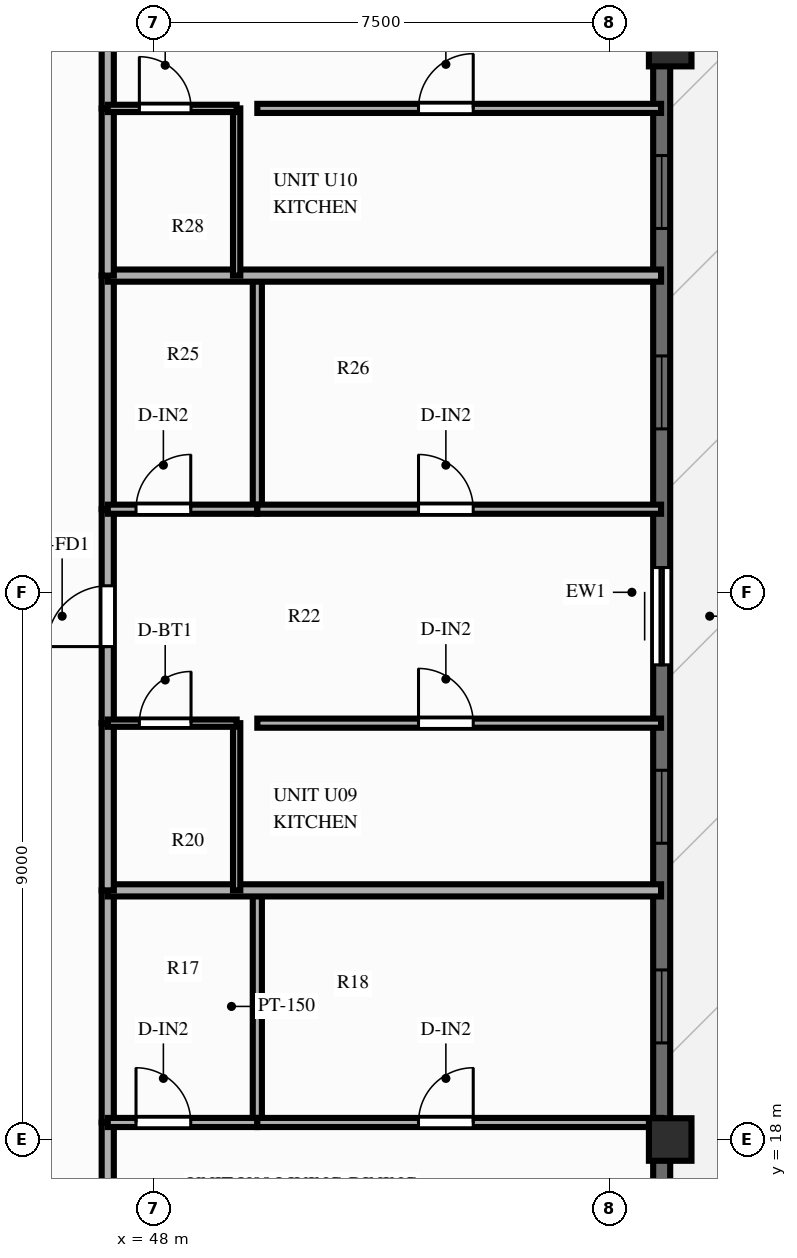
"""IFC4 building model, lengths in metres.
Left out: names, types, materials, properties, quantities, classifications, styles, units other than length and angle.
Written with IfcOpenShell. Run it as: python <this file> out.ifc"""

import sys

from ifc_helpers import new_model, si_unit, direction, frame, frame_2d, origin, origin_2d, place, context, subcontext, project, spatial, rectangle, extrude, source, transform, mapped, element, fill, save


model = new_model("IFC4")
c1 = context("Model", 3, precision=1e-05, world=origin(), true_north=direction((0.0, 1.0)))
c2 = subcontext(c1, "Body", "Model", "MODEL_VIEW")
j1 = project(units=[si_unit("LENGTHUNIT", "METRE"), si_unit("PLANEANGLEUNIT", "RADIAN")], contexts=[c1])
p1 = place(None, origin())
s1 = spatial("IfcSite", under=j1, at=p1, CompositionType="ELEMENT")
p2 = place(p1, origin())
s2 = spatial("IfcBuilding", under=s1, at=p2, CompositionType="ELEMENT")
p3 = place(p2, frame((0.0, 0.0, 216.3)))
s3 = spatial("IfcBuildingStorey", under=s2, at=p3, CompositionType="ELEMENT", Elevation=216.3)
m1 = source(origin(), c2, "Body", "SweptSolid", [
    extrude(rectangle(XDim=0.7, YDim=0.7, at=origin_2d()), origin(), (0.0, 0.0, 1.0), 3.9),
])
for number, where, z_axis, x_axis in (
    (1, (56.5, 18.0, 0.0), (0.0, 0.0, 1.0), (1.0, 0.0, 0.0)),
    (2, (56.5, 36.0, 0.0), (0.0, 0.0, 1.0), (1.0, 0.0, 0.0)),
):
    element("IfcColumn", number, at=place(p3, frame(where, z_axis=z_axis, x_axis=x_axis)), inside=s3, PredefinedType="COLUMN", context=c2, shape_type="MappedRepresentation", body=[
        mapped(m1, transform((0.0, 0.0, 0.0), scale=1.0)),
    ])
p4 = place(p3, frame((56.36, 11.5, 0.0), z_axis=(0.0, 0.0, 1.0), x_axis=(0.0, 1.0, 0.0)))
e3 = element("IfcWall", 3, at=p4, inside=s3, PredefinedType="SOLIDWALL", context=c2, shape_type="SweptSolid", body=[
    extrude(rectangle(XDim=31.0, YDim=0.28, at=frame_2d((15.5, 0.0))), origin(), (0.0, 0.0, 1.0), 2.44),
])
p5 = place(p4, frame((0.96, 0.0, 0.25)))
e4 = element("IfcOpeningElement", 4, at=p5, cuts=e3, PredefinedType="OPENING", context=c2, shape_type="SweptSolid", body=[
    extrude(rectangle(XDim=1.2, YDim=1.5, at=frame_2d((0.6, 0.75))), frame((0.0, 0.152, 0.0), z_axis=(0.0, -1.0, 0.0), x_axis=(1.0, 0.0, 0.0)), (0.0, 0.0, 1.0), 0.304),
])
p6 = place(p4, frame((4.02, 0.0, 0.25)))
e5 = element("IfcOpeningElement", 5, at=p6, cuts=e3, PredefinedType="OPENING", context=c2, shape_type="SweptSolid", body=[
    extrude(rectangle(XDim=1.2, YDim=1.5, at=frame_2d((0.6, 0.75))), frame((0.0, 0.152, 0.0), z_axis=(0.0, -1.0, 0.0), x_axis=(1.0, 0.0, 0.0)), (0.0, 0.0, 1.0), 0.304),
])
p7 = place(p4, frame((8.089, 0.0, 0.25)))
e6 = element("IfcOpeningElement", 6, at=p7, cuts=e3, PredefinedType="OPENING", context=c2, shape_type="SweptSolid", body=[
    extrude(rectangle(XDim=1.2, YDim=1.5, at=frame_2d((0.6, 0.75))), frame((0.0, 0.152, 0.0), z_axis=(0.0, -1.0, 0.0), x_axis=(1.0, 0.0, 0.0)), (0.0, 0.0, 1.0), 0.304),
])
p8 = place(p4, frame((11.373, 0.0, 0.25)))
e7 = element("IfcOpeningElement", 7, at=p8, cuts=e3, PredefinedType="OPENING", context=c2, shape_type="SweptSolid", body=[
    extrude(rectangle(XDim=1.2, YDim=1.5, at=frame_2d((0.6, 0.75))), frame((0.0, 0.152, 0.0), z_axis=(0.0, -1.0, 0.0), x_axis=(1.0, 0.0, 0.0)), (0.0, 0.0, 1.0), 0.304),
])
p9 = place(p4, frame((15.907, 0.0, 0.0), z_axis=(0.0, 0.0, 1.0), x_axis=(-1.0, 0.0, 0.0)))
e8 = element("IfcOpeningElement", 8, at=p9, cuts=e3, PredefinedType="OPENING", context=c2, shape_type="SweptSolid", body=[
    extrude(rectangle(XDim=1.6, YDim=2.15, at=frame_2d((0.8, 1.075))), frame((0.0, 0.152, 0.0), z_axis=(0.0, -1.0, 0.0), x_axis=(1.0, 0.0, 0.0)), (0.0, 0.0, 1.0), 0.304),
])
p10 = place(p4, frame((18.188, 0.0, 0.25)))
e9 = element("IfcOpeningElement", 9, at=p10, cuts=e3, PredefinedType="OPENING", context=c2, shape_type="SweptSolid", body=[
    extrude(rectangle(XDim=1.2, YDim=1.5, at=frame_2d((0.6, 0.75))), frame((0.0, 0.152, 0.0), z_axis=(0.0, -1.0, 0.0), x_axis=(1.0, 0.0, 0.0)), (0.0, 0.0, 1.0), 0.304),
])
p11 = place(p4, frame((21.484, 0.0, 0.25)))
e10 = element("IfcOpeningElement", 10, at=p11, cuts=e3, PredefinedType="OPENING", context=c2, shape_type="SweptSolid", body=[
    extrude(rectangle(XDim=1.2, YDim=1.5, at=frame_2d((0.6, 0.75))), frame((0.0, 0.152, 0.0), z_axis=(0.0, -1.0, 0.0), x_axis=(1.0, 0.0, 0.0)), (0.0, 0.0, 1.0), 0.304),
])
p12 = place(p4, frame((25.234, 0.0, 0.25)))
e11 = element("IfcOpeningElement", 11, at=p12, cuts=e3, PredefinedType="OPENING", context=c2, shape_type="SweptSolid", body=[
    extrude(rectangle(XDim=1.2, YDim=1.5, at=frame_2d((0.6, 0.75))), frame((0.0, 0.152, 0.0), z_axis=(0.0, -1.0, 0.0), x_axis=(1.0, 0.0, 0.0)), (0.0, 0.0, 1.0), 0.304),
])
p13 = place(p4, frame((28.294, 0.0, 0.25)))
e12 = element("IfcOpeningElement", 12, at=p13, cuts=e3, PredefinedType="OPENING", context=c2, shape_type="SweptSolid", body=[
    extrude(rectangle(XDim=1.2, YDim=1.5, at=frame_2d((0.6, 0.75))), frame((0.0, 0.152, 0.0), z_axis=(0.0, -1.0, 0.0), x_axis=(1.0, 0.0, 0.0)), (0.0, 0.0, 1.0), 0.304),
])
p14 = place(p3, frame((47.25, 14.43, 0.0), z_axis=(0.0, 0.0, 1.0), x_axis=(0.0, 1.0, 0.0)))
e13 = element("IfcWall", 13, at=p14, inside=s3, PredefinedType="PARTITIONING", context=c2, shape_type="SweptSolid", body=[
    extrude(rectangle(XDim=3.85, YDim=0.2, at=frame_2d((1.925, 0.0))), origin(), (0.0, 0.0, 1.0), 3.56),
])
p15 = place(p14, frame((1.425, 0.0, 0.0)))
e14 = element("IfcOpeningElement", 14, at=p15, cuts=e13, PredefinedType="OPENING", context=c2, shape_type="SweptSolid", body=[
    extrude(rectangle(XDim=1.0, YDim=2.15, at=frame_2d((0.5, 1.075))), frame((0.0, 0.112, 0.0), z_axis=(0.0, -1.0, 0.0), x_axis=(1.0, 0.0, 0.0)), (0.0, 0.0, 1.0), 0.224),
])
p16 = place(p3, frame((47.25, 18.28, 0.0), z_axis=(0.0, 0.0, 1.0), x_axis=(0.0, 1.0, 0.0)))
e15 = element("IfcWall", 15, at=p16, inside=s3, PredefinedType="PARTITIONING", context=c2, shape_type="SweptSolid", body=[
    extrude(rectangle(XDim=3.818, YDim=0.2, at=frame_2d((1.909, 0.0))), origin(), (0.0, 0.0, 1.0), 3.56),
])
p17 = place(p3, frame((49.71, 18.28, 0.0), z_axis=(0.0, 0.0, 1.0), x_axis=(0.0, 1.0, 0.0)))
e16 = element("IfcWall", 16, at=p17, inside=s3, PredefinedType="PARTITIONING", context=c2, shape_type="SweptSolid", body=[
    extrude(rectangle(XDim=3.818, YDim=0.15, at=frame_2d((1.909, 0.0))), origin(), (0.0, 0.0, 1.0), 3.56),
])
p18 = place(p3, frame((47.25, 18.28, 0.0), z_axis=(0.0, 0.0, 1.0), x_axis=(1.0, 0.0, 0.0)))
e17 = element("IfcWall", 17, at=p18, inside=s3, PredefinedType="PARTITIONING", context=c2, shape_type="SweptSolid", body=[
    extrude(rectangle(XDim=2.46, YDim=0.15, at=frame_2d((1.23, 0.0))), origin(), (0.0, 0.0, 1.0), 3.56),
])
p19 = place(p18, frame((0.465, 0.0, 0.0)))
e18 = element("IfcOpeningElement", 18, at=p19, cuts=e17, PredefinedType="OPENING", context=c2, shape_type="SweptSolid", body=[
    extrude(rectangle(XDim=0.9, YDim=2.1, at=frame_2d((0.45, 1.05))), frame((0.0, 0.087, 0.0), z_axis=(0.0, -1.0, 0.0), x_axis=(1.0, 0.0, 0.0)), (0.0, 0.0, 1.0), 0.174),
])
p20 = place(p3, frame((49.71, 18.28, 0.0), z_axis=(0.0, 0.0, 1.0), x_axis=(1.0, 0.0, 0.0)))
e19 = element("IfcWall", 19, at=p20, inside=s3, PredefinedType="PARTITIONING", context=c2, shape_type="SweptSolid", body=[
    extrude(rectangle(XDim=6.64, YDim=0.15, at=frame_2d((3.32, 0.0))), origin(), (0.0, 0.0, 1.0), 3.56),
])
p21 = place(p20, frame((2.651, 0.0, 0.0)))
e20 = element("IfcOpeningElement", 20, at=p21, cuts=e19, PredefinedType="OPENING", context=c2, shape_type="SweptSolid", body=[
    extrude(rectangle(XDim=0.9, YDim=2.1, at=frame_2d((0.45, 1.05))), frame((0.0, 0.087, 0.0), z_axis=(0.0, -1.0, 0.0), x_axis=(1.0, 0.0, 0.0)), (0.0, 0.0, 1.0), 0.174),
])
p22 = place(p3, frame((47.25, 22.098, 0.0), z_axis=(0.0, 0.0, 1.0), x_axis=(1.0, 0.0, 0.0)))
e21 = element("IfcWall", 21, at=p22, inside=s3, PredefinedType="PARTITIONING", context=c2, shape_type="SweptSolid", body=[
    extrude(rectangle(XDim=9.1, YDim=0.2, at=frame_2d((4.55, 0.0))), origin(), (0.0, 0.0, 1.0), 3.29),
])
p23 = place(p3, frame((47.25, 22.098, 0.0), z_axis=(0.0, 0.0, 1.0), x_axis=(0.0, 1.0, 0.0)))
e22 = element("IfcWall", 22, at=p23, inside=s3, PredefinedType="PARTITIONING", context=c2, shape_type="SweptSolid", body=[
    extrude(rectangle(XDim=2.75, YDim=0.2, at=frame_2d((1.375, 0.0))), origin(), (0.0, 0.0, 1.0), 3.56),
])
p24 = place(p3, frame((47.25, 24.848, 0.0), z_axis=(0.0, 0.0, 1.0), x_axis=(0.0, 1.0, 0.0)))
e23 = element("IfcWall", 23, at=p24, inside=s3, PredefinedType="PARTITIONING", context=c2, shape_type="SweptSolid", body=[
    extrude(rectangle(XDim=3.519, YDim=0.2, at=frame_2d((1.759, 0.0))), origin(), (0.0, 0.0, 1.0), 3.56),
])
p25 = place(p24, frame((1.26, 0.0, 0.0)))
e24 = element("IfcOpeningElement", 24, at=p25, cuts=e23, PredefinedType="OPENING", context=c2, shape_type="SweptSolid", body=[
    extrude(rectangle(XDim=1.0, YDim=2.15, at=frame_2d((0.5, 1.075))), frame((0.0, 0.112, 0.0), z_axis=(0.0, -1.0, 0.0), x_axis=(1.0, 0.0, 0.0)), (0.0, 0.0, 1.0), 0.224),
])
p26 = place(p3, frame((47.25, 28.366, 0.0), z_axis=(0.0, 0.0, 1.0), x_axis=(0.0, 1.0, 0.0)))
e25 = element("IfcWall", 25, at=p26, inside=s3, PredefinedType="PARTITIONING", context=c2, shape_type="SweptSolid", body=[
    extrude(rectangle(XDim=3.842, YDim=0.2, at=frame_2d((1.921, 0.0))), origin(), (0.0, 0.0, 1.0), 3.56),
])
p27 = place(p3, frame((49.37, 22.098, 0.0), z_axis=(0.0, 0.0, 1.0), x_axis=(0.0, 1.0, 0.0)))
e26 = element("IfcWall", 26, at=p27, inside=s3, PredefinedType="PARTITIONING", context=c2, shape_type="SweptSolid", body=[
    extrude(rectangle(XDim=2.75, YDim=0.12, at=frame_2d((1.375, 0.0))), origin(), (0.0, 0.0, 1.0), 3.56),
])
p28 = place(p3, frame((49.71, 28.366, 0.0), z_axis=(0.0, 0.0, 1.0), x_axis=(0.0, 1.0, 0.0)))
e27 = element("IfcWall", 27, at=p28, inside=s3, PredefinedType="PARTITIONING", context=c2, shape_type="SweptSolid", body=[
    extrude(rectangle(XDim=3.842, YDim=0.15, at=frame_2d((1.921, 0.0))), origin(), (0.0, 0.0, 1.0), 3.56),
])
p29 = place(p3, frame((47.25, 24.848, 0.0), z_axis=(0.0, 0.0, 1.0), x_axis=(1.0, 0.0, 0.0)))
e28 = element("IfcWall", 28, at=p29, inside=s3, PredefinedType="PARTITIONING", context=c2, shape_type="SweptSolid", body=[
    extrude(rectangle(XDim=2.12, YDim=0.12, at=frame_2d((1.06, 0.0))), origin(), (0.0, 0.0, 1.0), 3.56),
])
p30 = place(p29, frame((0.52, 0.0, 0.0)))
e29 = element("IfcOpeningElement", 29, at=p30, cuts=e28, PredefinedType="OPENING", context=c2, shape_type="SweptSolid", body=[
    extrude(rectangle(XDim=0.85, YDim=2.05, at=frame_2d((0.425, 1.025))), frame((0.0, 0.072, 0.0), z_axis=(0.0, -1.0, 0.0), x_axis=(1.0, 0.0, 0.0)), (0.0, 0.0, 1.0), 0.144),
])
p31 = place(p3, frame((49.71, 24.848, 0.0), z_axis=(0.0, 0.0, 1.0), x_axis=(1.0, 0.0, 0.0)))
e30 = element("IfcWall", 30, at=p31, inside=s3, PredefinedType="PARTITIONING", context=c2, shape_type="SweptSolid", body=[
    extrude(rectangle(XDim=6.64, YDim=0.15, at=frame_2d((3.32, 0.0))), origin(), (0.0, 0.0, 1.0), 3.56),
])
p32 = place(p31, frame((2.651, 0.0, 0.0)))
e31 = element("IfcOpeningElement", 31, at=p32, cuts=e30, PredefinedType="OPENING", context=c2, shape_type="SweptSolid", body=[
    extrude(rectangle(XDim=0.9, YDim=2.1, at=frame_2d((0.45, 1.05))), frame((0.0, 0.087, 0.0), z_axis=(0.0, -1.0, 0.0), x_axis=(1.0, 0.0, 0.0)), (0.0, 0.0, 1.0), 0.174),
])
p33 = place(p3, frame((47.25, 28.366, 0.0), z_axis=(0.0, 0.0, 1.0), x_axis=(1.0, 0.0, 0.0)))
e32 = element("IfcWall", 32, at=p33, inside=s3, PredefinedType="PARTITIONING", context=c2, shape_type="SweptSolid", body=[
    extrude(rectangle(XDim=2.46, YDim=0.15, at=frame_2d((1.23, 0.0))), origin(), (0.0, 0.0, 1.0), 3.56),
])
p34 = place(p33, frame((0.465, 0.0, 0.0)))
e33 = element("IfcOpeningElement", 33, at=p34, cuts=e32, PredefinedType="OPENING", context=c2, shape_type="SweptSolid", body=[
    extrude(rectangle(XDim=0.9, YDim=2.1, at=frame_2d((0.45, 1.05))), frame((0.0, 0.087, 0.0), z_axis=(0.0, -1.0, 0.0), x_axis=(1.0, 0.0, 0.0)), (0.0, 0.0, 1.0), 0.174),
])
p35 = place(p3, frame((49.71, 28.366, 0.0), z_axis=(0.0, 0.0, 1.0), x_axis=(1.0, 0.0, 0.0)))
e34 = element("IfcWall", 34, at=p35, inside=s3, PredefinedType="PARTITIONING", context=c2, shape_type="SweptSolid", body=[
    extrude(rectangle(XDim=6.64, YDim=0.15, at=frame_2d((3.32, 0.0))), origin(), (0.0, 0.0, 1.0), 3.56),
])
p36 = place(p35, frame((2.651, 0.0, 0.0)))
e35 = element("IfcOpeningElement", 35, at=p36, cuts=e34, PredefinedType="OPENING", context=c2, shape_type="SweptSolid", body=[
    extrude(rectangle(XDim=0.9, YDim=2.1, at=frame_2d((0.45, 1.05))), frame((0.0, 0.087, 0.0), z_axis=(0.0, -1.0, 0.0), x_axis=(1.0, 0.0, 0.0)), (0.0, 0.0, 1.0), 0.174),
])
p37 = place(p3, frame((47.25, 32.209, 0.0), z_axis=(0.0, 0.0, 1.0), x_axis=(1.0, 0.0, 0.0)))
e36 = element("IfcWall", 36, at=p37, inside=s3, PredefinedType="PARTITIONING", context=c2, shape_type="SweptSolid", body=[
    extrude(rectangle(XDim=9.1, YDim=0.2, at=frame_2d((4.55, 0.0))), origin(), (0.0, 0.0, 1.0), 3.29),
])
p38 = place(p3, frame((47.25, 32.209, 0.0), z_axis=(0.0, 0.0, 1.0), x_axis=(0.0, 1.0, 0.0)))
e37 = element("IfcWall", 37, at=p38, inside=s3, PredefinedType="PARTITIONING", context=c2, shape_type="SweptSolid", body=[
    extrude(rectangle(XDim=2.75, YDim=0.2, at=frame_2d((1.375, 0.0))), origin(), (0.0, 0.0, 1.0), 3.56),
])
p39 = place(p3, frame((47.25, 34.959, 0.0), z_axis=(0.0, 0.0, 1.0), x_axis=(0.0, 1.0, 0.0)))
e38 = element("IfcWall", 38, at=p39, inside=s3, PredefinedType="PARTITIONING", context=c2, shape_type="SweptSolid", body=[
    extrude(rectangle(XDim=3.519, YDim=0.2, at=frame_2d((1.76, 0.0))), origin(), (0.0, 0.0, 1.0), 3.56),
])
p40 = place(p39, frame((2.217, 0.0, 0.0)))
e39 = element("IfcOpeningElement", 39, at=p40, cuts=e38, PredefinedType="OPENING", context=c2, shape_type="SweptSolid", body=[
    extrude(rectangle(XDim=1.0, YDim=2.15, at=frame_2d((0.5, 1.075))), frame((0.0, 0.112, 0.0), z_axis=(0.0, -1.0, 0.0), x_axis=(1.0, 0.0, 0.0)), (0.0, 0.0, 1.0), 0.224),
])
p41 = place(p3, frame((49.37, 32.209, 0.0), z_axis=(0.0, 0.0, 1.0), x_axis=(0.0, 1.0, 0.0)))
e40 = element("IfcWall", 40, at=p41, inside=s3, PredefinedType="PARTITIONING", context=c2, shape_type="SweptSolid", body=[
    extrude(rectangle(XDim=2.75, YDim=0.12, at=frame_2d((1.375, 0.0))), origin(), (0.0, 0.0, 1.0), 3.56),
])
p42 = place(p3, frame((47.25, 34.959, 0.0), z_axis=(0.0, 0.0, 1.0), x_axis=(1.0, 0.0, 0.0)))
e41 = element("IfcWall", 41, at=p42, inside=s3, PredefinedType="PARTITIONING", context=c2, shape_type="SweptSolid", body=[
    extrude(rectangle(XDim=2.12, YDim=0.12, at=frame_2d((1.06, 0.0))), origin(), (0.0, 0.0, 1.0), 3.56),
])
p43 = place(p42, frame((0.52, 0.0, 0.0)))
e42 = element("IfcOpeningElement", 42, at=p43, cuts=e41, PredefinedType="OPENING", context=c2, shape_type="SweptSolid", body=[
    extrude(rectangle(XDim=0.85, YDim=2.05, at=frame_2d((0.425, 1.025))), frame((0.0, 0.072, 0.0), z_axis=(0.0, -1.0, 0.0), x_axis=(1.0, 0.0, 0.0)), (0.0, 0.0, 1.0), 0.144),
])
p44 = place(p3, frame((49.71, 34.959, 0.0), z_axis=(0.0, 0.0, 1.0), x_axis=(1.0, 0.0, 0.0)))
e43 = element("IfcWall", 43, at=p44, inside=s3, PredefinedType="PARTITIONING", context=c2, shape_type="SweptSolid", body=[
    extrude(rectangle(XDim=6.64, YDim=0.15, at=frame_2d((3.32, 0.0))), origin(), (0.0, 0.0, 1.0), 3.56),
])
p45 = place(p44, frame((2.651, 0.0, 0.0)))
e44 = element("IfcOpeningElement", 44, at=p45, cuts=e43, PredefinedType="OPENING", context=c2, shape_type="SweptSolid", body=[
    extrude(rectangle(XDim=0.9, YDim=2.1, at=frame_2d((0.45, 1.05))), frame((0.0, 0.087, 0.0), z_axis=(0.0, -1.0, 0.0), x_axis=(1.0, 0.0, 0.0)), (0.0, 0.0, 1.0), 0.174),
])
m2 = source(origin(), c2, "Body", "SweptSolid", [
    extrude(rectangle(XDim=1.2, YDim=1.5, at=frame_2d((0.6, 0.75))), frame((0.0, 0.03, 0.0), z_axis=(0.0, -1.0, 0.0), x_axis=(1.0, 0.0, 0.0)), (0.0, 0.0, 1.0), 0.06),
])
p46 = place(p7, origin())
e45 = element("IfcWindow", 45, at=p46, inside=s3, PartitioningType="SINGLE_PANEL", PredefinedType="WINDOW", context=c2, shape_type="MappedRepresentation", body=[
    mapped(m2, transform((0.0, 0.0, 0.0), scale=1.0)),
])
fill(e6, e45)
p47 = place(p8, origin())
e46 = element("IfcWindow", 46, at=p47, inside=s3, PartitioningType="SINGLE_PANEL", PredefinedType="WINDOW", context=c2, shape_type="MappedRepresentation", body=[
    mapped(m2, transform((0.0, 0.0, 0.0), scale=1.0)),
])
fill(e7, e46)
m3 = source(origin(), c2, "Body", "SweptSolid", [
    extrude(rectangle(XDim=1.6, YDim=2.15, at=frame_2d((0.8, 1.075))), frame((0.0, 0.025, 0.0), z_axis=(0.0, -1.0, 0.0), x_axis=(1.0, 0.0, 0.0)), (0.0, 0.0, 1.0), 0.05),
])
p48 = place(p9, origin())
e47 = element("IfcDoor", 47, at=p48, inside=s3, OperationType="SLIDING_TO_LEFT", PredefinedType="DOOR", context=c2, shape_type="MappedRepresentation", body=[
    mapped(m3, transform((0.0, 0.0, 0.0), scale=1.0)),
])
fill(e8, e47)
p49 = place(p10, origin())
e48 = element("IfcWindow", 48, at=p49, inside=s3, PartitioningType="SINGLE_PANEL", PredefinedType="WINDOW", context=c2, shape_type="MappedRepresentation", body=[
    mapped(m2, transform((0.0, 0.0, 0.0), scale=1.0)),
])
fill(e9, e48)
p50 = place(p11, origin())
e49 = element("IfcWindow", 49, at=p50, inside=s3, PartitioningType="SINGLE_PANEL", PredefinedType="WINDOW", context=c2, shape_type="MappedRepresentation", body=[
    mapped(m2, transform((0.0, 0.0, 0.0), scale=1.0)),
])
fill(e10, e49)
m4 = source(origin(), c2, "Body", "SweptSolid", [
    extrude(rectangle(XDim=0.9, YDim=2.1, at=frame_2d((0.45, 1.05))), frame((0.0, 0.025, 0.0), z_axis=(0.0, -1.0, 0.0), x_axis=(1.0, 0.0, 0.0)), (0.0, 0.0, 1.0), 0.05),
])
p51 = place(p19, origin())
e50 = element("IfcDoor", 50, at=p51, inside=s3, OperationType="SINGLE_SWING_LEFT", PredefinedType="DOOR", context=c2, shape_type="MappedRepresentation", body=[
    mapped(m4, transform((0.0, 0.0, 0.0), scale=1.0)),
])
fill(e18, e50)
p52 = place(p21, origin())
e51 = element("IfcDoor", 51, at=p52, inside=s3, OperationType="SINGLE_SWING_RIGHT", PredefinedType="DOOR", context=c2, shape_type="MappedRepresentation", body=[
    mapped(m4, transform((0.0, 0.0, 0.0), scale=1.0)),
])
fill(e20, e51)
m5 = source(origin(), c2, "Body", "SweptSolid", [
    extrude(rectangle(XDim=1.0, YDim=2.15, at=frame_2d((0.5, 1.075))), frame((0.0, 0.025, 0.0), z_axis=(0.0, -1.0, 0.0), x_axis=(1.0, 0.0, 0.0)), (0.0, 0.0, 1.0), 0.05),
])
p53 = place(p25, origin())
e52 = element("IfcDoor", 52, at=p53, inside=s3, OperationType="SINGLE_SWING_LEFT", PredefinedType="DOOR", context=c2, shape_type="MappedRepresentation", body=[
    mapped(m5, transform((0.0, 0.0, 0.0), scale=1.0)),
])
fill(e24, e52)
m6 = source(origin(), c2, "Body", "SweptSolid", [
    extrude(rectangle(XDim=0.85, YDim=2.05, at=frame_2d((0.425, 1.025))), frame((0.0, 0.025, 0.0), z_axis=(0.0, -1.0, 0.0), x_axis=(1.0, 0.0, 0.0)), (0.0, 0.0, 1.0), 0.05),
])
p54 = place(p30, origin())
e53 = element("IfcDoor", 53, at=p54, inside=s3, OperationType="SINGLE_SWING_RIGHT", PredefinedType="DOOR", context=c2, shape_type="MappedRepresentation", body=[
    mapped(m6, transform((0.0, 0.0, 0.0), scale=1.0)),
])
fill(e29, e53)
p55 = place(p32, origin())
e54 = element("IfcDoor", 54, at=p55, inside=s3, OperationType="SINGLE_SWING_LEFT", PredefinedType="DOOR", context=c2, shape_type="MappedRepresentation", body=[
    mapped(m4, transform((0.0, 0.0, 0.0), scale=1.0)),
])
fill(e31, e54)
p56 = place(p34, origin())
e55 = element("IfcDoor", 55, at=p56, inside=s3, OperationType="SINGLE_SWING_RIGHT", PredefinedType="DOOR", context=c2, shape_type="MappedRepresentation", body=[
    mapped(m4, transform((0.0, 0.0, 0.0), scale=1.0)),
])
fill(e33, e55)
p57 = place(p36, origin())
e56 = element("IfcDoor", 56, at=p57, inside=s3, OperationType="SINGLE_SWING_LEFT", PredefinedType="DOOR", context=c2, shape_type="MappedRepresentation", body=[
    mapped(m4, transform((0.0, 0.0, 0.0), scale=1.0)),
])
fill(e35, e56)
p58 = place(p43, origin())
e57 = element("IfcDoor", 57, at=p58, inside=s3, OperationType="SINGLE_SWING_LEFT", PredefinedType="DOOR", context=c2, shape_type="MappedRepresentation", body=[
    mapped(m6, transform((0.0, 0.0, 0.0), scale=1.0)),
])
fill(e42, e57)
p59 = place(p45, origin())
e58 = element("IfcDoor", 58, at=p59, inside=s3, OperationType="SINGLE_SWING_RIGHT", PredefinedType="DOOR", context=c2, shape_type="MappedRepresentation", body=[
    mapped(m4, transform((0.0, 0.0, 0.0), scale=1.0)),
])
fill(e44, e58)
save(model, sys.argv[1])
